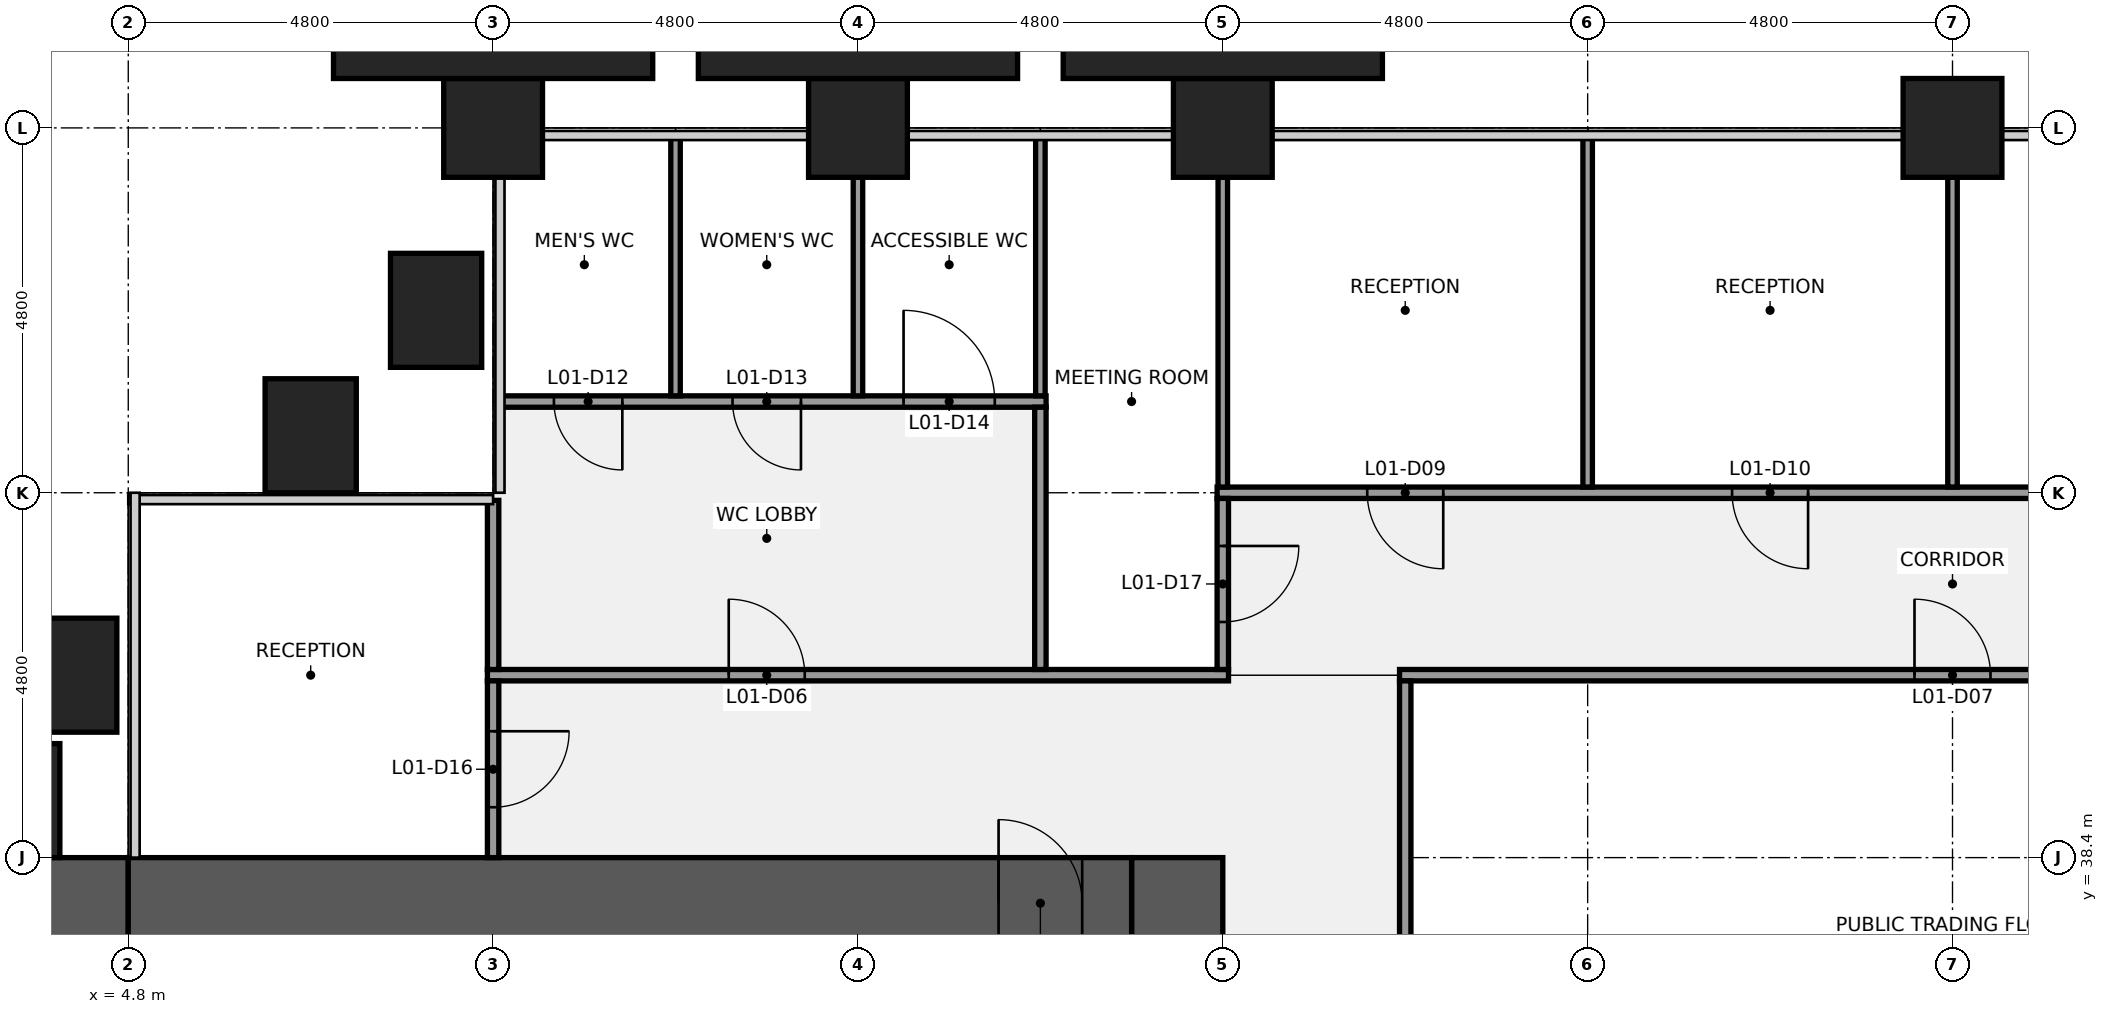
"""IFC4 building model, lengths in metres.
Left out: names, types, materials, properties, quantities, classifications, styles, units other than length and angle.
Written with IfcOpenShell. Run it as: python <this file> out.ifc"""

import sys

from ifc_helpers import new_model, si_unit, direction, frame, frame_2d, origin, origin_2d, place, context, subcontext, project, spatial, rectangle, extrude, element, fill, save


model = new_model("IFC4")
c1 = context("Model", 3, precision=1e-05, world=origin(), true_north=direction((0.0, 1.0)))
c2 = subcontext(c1, "Body", "Model", "MODEL_VIEW")
j1 = project(units=[si_unit("LENGTHUNIT", "METRE"), si_unit("PLANEANGLEUNIT", "RADIAN")], contexts=[c1])
p1 = place(None, origin())
s1 = spatial("IfcSite", under=j1, at=p1, CompositionType="ELEMENT")
p2 = place(p1, origin())
s2 = spatial("IfcBuilding", under=s1, at=p2, CompositionType="ELEMENT")
p3 = place(p2, frame((0.0, 0.0, 12.6)))
s3 = spatial("IfcBuildingStorey", under=s2, at=p3, CompositionType="ELEMENT", Elevation=12.6)
for number, where, z_axis, x_axis in (
    (1, (9.6, 48.0, 0.0), (0.0, 0.0, 1.0), (1.0, 0.0, 0.0)),
    (2, (14.4, 48.0, 0.0), (0.0, 0.0, 1.0), (1.0, 0.0, 0.0)),
    (3, (19.2, 48.0, 0.0), (0.0, 0.0, 1.0), (1.0, 0.0, 0.0)),
    (4, (28.8, 48.0, 0.0), (0.0, 0.0, 1.0), (1.0, 0.0, 0.0)),
):
    element("IfcColumn", number, at=place(p3, frame(where, z_axis=z_axis, x_axis=x_axis)), inside=s3, PredefinedType="COLUMN", context=c2, shape_type="SweptSolid", body=[
        extrude(rectangle(XDim=1.3, YDim=1.3, at=origin_2d()), origin(), (0.0, 0.0, 1.0), 4.4),
    ])
p4 = place(p3, frame((18.6, 38.4, 0.0), z_axis=(0.0, 0.0, 1.0), x_axis=(0.0, -1.0, 0.0)))
e5 = element("IfcWall", 5, at=p4, inside=s3, PredefinedType="SHEAR", context=c2, shape_type="SweptSolid", body=[
    extrude(rectangle(XDim=28.8, YDim=1.2, at=frame_2d((14.4, 0.0))), origin(), (0.0, 0.0, 1.0), 4.24),
])
p5 = place(p4, frame((18.3, 0.0, 0.0)))
e6 = element("IfcOpeningElement", 6, at=p5, cuts=e5, PredefinedType="OPENING", context=c2, shape_type="SweptSolid", body=[
    extrude(rectangle(XDim=1.8, YDim=2.1, at=frame_2d((0.9, 1.05))), frame((0.0, 0.61, 0.0), z_axis=(0.0, -1.0, 0.0), x_axis=(1.0, 0.0, 0.0)), (0.0, 0.0, 1.0), 1.22),
])
p6 = place(p4, frame((8.7, 0.0, 0.0)))
e7 = element("IfcOpeningElement", 7, at=p6, cuts=e5, PredefinedType="OPENING", context=c2, shape_type="SweptSolid", body=[
    extrude(rectangle(XDim=1.8, YDim=2.1, at=frame_2d((0.9, 1.05))), frame((0.0, 0.61, 0.0), z_axis=(0.0, -1.0, 0.0), x_axis=(1.0, 0.0, 0.0)), (0.0, 0.0, 1.0), 1.22),
])
p7 = place(p3, frame((1.2, 37.8, 0.0), z_axis=(0.0, 0.0, 1.0), x_axis=(1.0, 0.0, 0.0)))
e8 = element("IfcWall", 8, at=p7, inside=s3, PredefinedType="SHEAR", context=c2, shape_type="SweptSolid", body=[
    extrude(rectangle(XDim=3.6, YDim=1.2, at=frame_2d((1.8, 0.0))), origin(), (0.0, 0.0, 1.0), 4.24),
])
p8 = place(p3, frame((4.8, 37.8, 0.0), z_axis=(0.0, 0.0, 1.0), x_axis=(1.0, 0.0, 0.0)))
e9 = element("IfcWall", 9, at=p8, inside=s3, PredefinedType="SHEAR", context=c2, shape_type="SweptSolid", body=[
    extrude(rectangle(XDim=13.2, YDim=1.2, at=frame_2d((6.6, 0.0))), origin(), (0.0, 0.0, 1.0), 4.24),
])
p9 = place(p8, frame((11.45, 0.0, 0.0)))
e10 = element("IfcOpeningElement", 10, at=p9, cuts=e9, PredefinedType="OPENING", context=c2, shape_type="SweptSolid", body=[
    extrude(rectangle(XDim=1.1, YDim=2.1, at=frame_2d((0.55, 1.05))), frame((0.0, 0.61, 0.0), z_axis=(0.0, -1.0, 0.0), x_axis=(1.0, 0.0, 0.0)), (0.0, 0.0, 1.0), 1.22),
])
p10 = place(p3, frame((9.525, 40.8, 0.0), z_axis=(0.0, 0.0, 1.0), x_axis=(1.0, 0.0, 0.0)))
e11 = element("IfcWall", 11, at=p10, inside=s3, PredefinedType="PARTITIONING", context=c2, shape_type="SweptSolid", body=[
    extrude(rectangle(XDim=9.75, YDim=0.15, at=frame_2d((4.875, 0.0))), origin(), (0.0, 0.0, 1.0), 3.27),
])
p11 = place(p10, frame((3.175, 0.0, 0.0)))
e12 = element("IfcOpeningElement", 12, at=p11, cuts=e11, PredefinedType="OPENING", context=c2, shape_type="SweptSolid", body=[
    extrude(rectangle(XDim=1.0, YDim=2.1, at=frame_2d((0.5, 1.05))), frame((0.0, 0.085, 0.0), z_axis=(0.0, -1.0, 0.0), x_axis=(1.0, 0.0, 0.0)), (0.0, 0.0, 1.0), 0.17),
])
p12 = place(p3, frame((21.525, 40.8, 0.0), z_axis=(0.0, 0.0, 1.0), x_axis=(1.0, 0.0, 0.0)))
e13 = element("IfcWall", 13, at=p12, inside=s3, PredefinedType="PARTITIONING", context=c2, shape_type="SweptSolid", body=[
    extrude(rectangle(XDim=14.55, YDim=0.15, at=frame_2d((7.275, 0.0))), origin(), (0.0, 0.0, 1.0), 3.27),
])
p13 = place(p12, frame((6.775, 0.0, 0.0)))
e14 = element("IfcOpeningElement", 14, at=p13, cuts=e13, PredefinedType="OPENING", context=c2, shape_type="SweptSolid", body=[
    extrude(rectangle(XDim=1.0, YDim=2.1, at=frame_2d((0.5, 1.05))), frame((0.0, 0.085, 0.0), z_axis=(0.0, -1.0, 0.0), x_axis=(1.0, 0.0, 0.0)), (0.0, 0.0, 1.0), 0.17),
])
p14 = place(p3, frame((19.125, 43.2, 0.0), z_axis=(0.0, 0.0, 1.0), x_axis=(1.0, 0.0, 0.0)))
e15 = element("IfcWall", 15, at=p14, inside=s3, PredefinedType="PARTITIONING", context=c2, shape_type="SweptSolid", body=[
    extrude(rectangle(XDim=19.35, YDim=0.15, at=frame_2d((9.675, 0.0))), origin(), (0.0, 0.0, 1.0), 3.27),
])
p15 = place(p14, frame((1.975, 0.0, 0.0)))
e16 = element("IfcOpeningElement", 16, at=p15, cuts=e15, PredefinedType="OPENING", context=c2, shape_type="SweptSolid", body=[
    extrude(rectangle(XDim=1.0, YDim=2.1, at=frame_2d((0.5, 1.05))), frame((0.0, 0.085, 0.0), z_axis=(0.0, -1.0, 0.0), x_axis=(1.0, 0.0, 0.0)), (0.0, 0.0, 1.0), 0.17),
])
p16 = place(p14, frame((6.775, 0.0, 0.0)))
e17 = element("IfcOpeningElement", 17, at=p16, cuts=e15, PredefinedType="OPENING", context=c2, shape_type="SweptSolid", body=[
    extrude(rectangle(XDim=1.0, YDim=2.1, at=frame_2d((0.5, 1.05))), frame((0.0, 0.085, 0.0), z_axis=(0.0, -1.0, 0.0), x_axis=(1.0, 0.0, 0.0)), (0.0, 0.0, 1.0), 0.17),
])
p17 = place(p14, frame((13.975, 0.0, 0.0)))
e18 = element("IfcOpeningElement", 18, at=p17, cuts=e15, PredefinedType="OPENING", context=c2, shape_type="SweptSolid", body=[
    extrude(rectangle(XDim=1.0, YDim=2.1, at=frame_2d((0.5, 1.05))), frame((0.0, 0.085, 0.0), z_axis=(0.0, -1.0, 0.0), x_axis=(1.0, 0.0, 0.0)), (0.0, 0.0, 1.0), 0.17),
])
p18 = place(p3, frame((9.7, 44.4, 0.0), z_axis=(0.0, 0.0, 1.0), x_axis=(1.0, 0.0, 0.0)))
e19 = element("IfcWall", 19, at=p18, inside=s3, PredefinedType="PARTITIONING", context=c2, shape_type="SweptSolid", body=[
    extrude(rectangle(XDim=7.175, YDim=0.15, at=frame_2d((3.587, 0.0))), origin(), (0.0, 0.0, 1.0), 3.27),
])
p19 = place(p18, frame((0.7, 0.0, 0.0)))
e20 = element("IfcOpeningElement", 20, at=p19, cuts=e19, PredefinedType="OPENING", context=c2, shape_type="SweptSolid", body=[
    extrude(rectangle(XDim=0.9, YDim=2.1, at=frame_2d((0.45, 1.05))), frame((0.0, 0.085, 0.0), z_axis=(0.0, -1.0, 0.0), x_axis=(1.0, 0.0, 0.0)), (0.0, 0.0, 1.0), 0.17),
])
p20 = place(p18, frame((3.05, 0.0, 0.0)))
e21 = element("IfcOpeningElement", 21, at=p20, cuts=e19, PredefinedType="OPENING", context=c2, shape_type="SweptSolid", body=[
    extrude(rectangle(XDim=0.9, YDim=2.1, at=frame_2d((0.45, 1.05))), frame((0.0, 0.085, 0.0), z_axis=(0.0, -1.0, 0.0), x_axis=(1.0, 0.0, 0.0)), (0.0, 0.0, 1.0), 0.17),
])
p21 = place(p18, frame((5.3, 0.0, 0.0)))
e22 = element("IfcOpeningElement", 22, at=p21, cuts=e19, PredefinedType="OPENING", context=c2, shape_type="SweptSolid", body=[
    extrude(rectangle(XDim=1.2, YDim=2.1, at=frame_2d((0.6, 1.05))), frame((0.0, 0.085, 0.0), z_axis=(0.0, -1.0, 0.0), x_axis=(1.0, 0.0, 0.0)), (0.0, 0.0, 1.0), 0.17),
])
p22 = place(p3, frame((9.6, 38.4, 0.0), z_axis=(0.0, 0.0, 1.0), x_axis=(0.0, 1.0, 0.0)))
e23 = element("IfcWall", 23, at=p22, inside=s3, PredefinedType="PARTITIONING", context=c2, shape_type="SweptSolid", body=[
    extrude(rectangle(XDim=2.325, YDim=0.15, at=frame_2d((1.163, 0.0))), origin(), (0.0, 0.0, 1.0), 3.27),
])
p23 = place(p22, frame((0.663, 0.0, 0.0)))
e24 = element("IfcOpeningElement", 24, at=p23, cuts=e23, PredefinedType="OPENING", context=c2, shape_type="SweptSolid", body=[
    extrude(rectangle(XDim=1.0, YDim=2.1, at=frame_2d((0.5, 1.05))), frame((0.0, 0.085, 0.0), z_axis=(0.0, -1.0, 0.0), x_axis=(1.0, 0.0, 0.0)), (0.0, 0.0, 1.0), 0.17),
])
p24 = place(p3, frame((9.6, 40.875, 0.0), z_axis=(0.0, 0.0, 1.0), x_axis=(0.0, 1.0, 0.0)))
e25 = element("IfcWall", 25, at=p24, inside=s3, PredefinedType="PARTITIONING", context=c2, shape_type="SweptSolid", body=[
    extrude(rectangle(XDim=2.225, YDim=0.15, at=frame_2d((1.113, 0.0))), origin(), (0.0, 0.0, 1.0), 3.27),
])
p25 = place(p3, frame((12.0, 44.475, 0.0), z_axis=(0.0, 0.0, 1.0), x_axis=(0.0, 1.0, 0.0)))
e26 = element("IfcWall", 26, at=p25, inside=s3, PredefinedType="PARTITIONING", context=c2, shape_type="SweptSolid", body=[
    extrude(rectangle(XDim=3.425, YDim=0.125, at=frame_2d((1.712, 0.0))), origin(), (0.0, 0.0, 1.0), 3.27),
])
p26 = place(p3, frame((14.4, 44.475, 0.0), z_axis=(0.0, 0.0, 1.0), x_axis=(0.0, 1.0, 0.0)))
e27 = element("IfcWall", 27, at=p26, inside=s3, PredefinedType="PARTITIONING", context=c2, shape_type="SweptSolid", body=[
    extrude(rectangle(XDim=2.875, YDim=0.125, at=frame_2d((1.438, 0.0))), origin(), (0.0, 0.0, 1.0), 3.27),
])
p27 = place(p3, frame((16.8, 44.475, 0.0), z_axis=(0.0, 0.0, 1.0), x_axis=(0.0, 1.0, 0.0)))
e28 = element("IfcWall", 28, at=p27, inside=s3, PredefinedType="PARTITIONING", context=c2, shape_type="SweptSolid", body=[
    extrude(rectangle(XDim=3.425, YDim=0.125, at=frame_2d((1.712, 0.0))), origin(), (0.0, 0.0, 1.0), 3.27),
])
p28 = place(p3, frame((16.8, 40.875, 0.0), z_axis=(0.0, 0.0, 1.0), x_axis=(0.0, 1.0, 0.0)))
e29 = element("IfcWall", 29, at=p28, inside=s3, PredefinedType="PARTITIONING", context=c2, shape_type="SweptSolid", body=[
    extrude(rectangle(XDim=3.45, YDim=0.15, at=frame_2d((1.725, 0.0))), origin(), (0.0, 0.0, 1.0), 3.27),
])
p29 = place(p3, frame((19.2, 43.275, 0.0), z_axis=(0.0, 0.0, 1.0), x_axis=(0.0, 1.0, 0.0)))
e30 = element("IfcWall", 30, at=p29, inside=s3, PredefinedType="PARTITIONING", context=c2, shape_type="SweptSolid", body=[
    extrude(rectangle(XDim=4.075, YDim=0.125, at=frame_2d((2.038, 0.0))), origin(), (0.0, 0.0, 1.0), 3.27),
])
p30 = place(p3, frame((19.2, 40.875, 0.0), z_axis=(0.0, 0.0, 1.0), x_axis=(0.0, 1.0, 0.0)))
e31 = element("IfcWall", 31, at=p30, inside=s3, PredefinedType="PARTITIONING", context=c2, shape_type="SweptSolid", body=[
    extrude(rectangle(XDim=2.25, YDim=0.15, at=frame_2d((1.125, 0.0))), origin(), (0.0, 0.0, 1.0), 3.27),
])
p31 = place(p30, frame((0.625, 0.0, 0.0)))
e32 = element("IfcOpeningElement", 32, at=p31, cuts=e31, PredefinedType="OPENING", context=c2, shape_type="SweptSolid", body=[
    extrude(rectangle(XDim=1.0, YDim=2.1, at=frame_2d((0.5, 1.05))), frame((0.0, 0.085, 0.0), z_axis=(0.0, -1.0, 0.0), x_axis=(1.0, 0.0, 0.0)), (0.0, 0.0, 1.0), 0.17),
])
p32 = place(p3, frame((21.6, 33.663, 0.0), z_axis=(0.0, 0.0, 1.0), x_axis=(0.0, 1.0, 0.0)))
e33 = element("IfcWall", 33, at=p32, inside=s3, PredefinedType="PARTITIONING", context=c2, shape_type="SweptSolid", body=[
    extrude(rectangle(XDim=7.062, YDim=0.15, at=frame_2d((3.531, 0.0))), origin(), (0.0, 0.0, 1.0), 3.27),
])
p33 = place(p3, frame((24.0, 43.275, 0.0), z_axis=(0.0, 0.0, 1.0), x_axis=(0.0, 1.0, 0.0)))
e34 = element("IfcWall", 34, at=p33, inside=s3, PredefinedType="PARTITIONING", context=c2, shape_type="SweptSolid", body=[
    extrude(rectangle(XDim=4.625, YDim=0.125, at=frame_2d((2.312, 0.0))), origin(), (0.0, 0.0, 1.0), 3.27),
])
p34 = place(p3, frame((28.8, 43.275, 0.0), z_axis=(0.0, 0.0, 1.0), x_axis=(0.0, 1.0, 0.0)))
e35 = element("IfcWall", 35, at=p34, inside=s3, PredefinedType="PARTITIONING", context=c2, shape_type="SweptSolid", body=[
    extrude(rectangle(XDim=4.075, YDim=0.125, at=frame_2d((2.038, 0.0))), origin(), (0.0, 0.0, 1.0), 3.27),
])
for number, where, z_axis, x_axis in (
    (36, (8.85, 45.6, 0.0), (0.0, 0.0, 1.0), (0.0, 1.0, 0.0)),
    (37, (7.2, 43.95, 0.0), (0.0, 0.0, 1.0), (1.0, 0.0, 0.0)),
    (38, (4.05, 40.8, 0.0), (0.0, 0.0, 1.0), (0.0, 1.0, 0.0)),
):
    element("IfcColumn", number, at=place(p3, frame(where, z_axis=z_axis, x_axis=x_axis)), inside=s3, PredefinedType="PILASTER", context=c2, shape_type="SweptSolid", body=[
        extrude(rectangle(XDim=1.2, YDim=1.5, at=origin_2d()), origin(), (0.0, 0.0, 1.0), 4.4),
    ])
p35 = place(p3, frame((2.4, 39.15, 0.0), z_axis=(0.0, 0.0, 1.0), x_axis=(1.0, 0.0, 0.0)))
e39 = element("IfcColumn", 39, at=p35, inside=s3, PredefinedType="PILASTER", context=c2, shape_type="SweptSolid", body=[
    extrude(rectangle(XDim=3.0, YDim=1.5, at=origin_2d()), origin(), (0.0, 0.0, 1.0), 4.4),
])
for number, where, z_axis, x_axis in (
    (40, (9.6, 49.075, 0.0), (0.0, 0.0, 1.0), (1.0, 0.0, 0.0)),
    (41, (14.4, 49.075, 0.0), (0.0, 0.0, 1.0), (1.0, 0.0, 0.0)),
    (42, (19.2, 49.075, 0.0), (0.0, 0.0, 1.0), (1.0, 0.0, 0.0)),
):
    element("IfcColumn", number, at=place(p3, frame(where, z_axis=z_axis, x_axis=x_axis)), inside=s3, PredefinedType="PILASTER", context=c2, shape_type="SweptSolid", body=[
        extrude(rectangle(XDim=4.2, YDim=0.85, at=origin_2d()), origin(), (0.0, 0.0, 1.0), 4.4),
    ])
p36 = place(p9, origin())
e43 = element("IfcDoor", 43, at=p36, inside=s3, OperationType="SINGLE_SWING_LEFT", PredefinedType="DOOR", context=c2, shape_type="SweptSolid", body=[
    extrude(rectangle(XDim=1.1, YDim=2.1, at=frame_2d((0.55, 1.05))), frame((0.0, 0.025, 0.0), z_axis=(0.0, -1.0, 0.0), x_axis=(1.0, 0.0, 0.0)), (0.0, 0.0, 1.0), 0.05),
])
fill(e10, e43)
p37 = place(p11, origin())
e44 = element("IfcDoor", 44, at=p37, inside=s3, OperationType="SINGLE_SWING_LEFT", PredefinedType="DOOR", context=c2, shape_type="SweptSolid", body=[
    extrude(rectangle(XDim=1.0, YDim=2.1, at=frame_2d((0.5, 1.05))), frame((0.0, 0.025, 0.0), z_axis=(0.0, -1.0, 0.0), x_axis=(1.0, 0.0, 0.0)), (0.0, 0.0, 1.0), 0.05),
])
fill(e12, e44)
p38 = place(p13, origin())
e45 = element("IfcDoor", 45, at=p38, inside=s3, OperationType="SINGLE_SWING_LEFT", PredefinedType="DOOR", context=c2, shape_type="SweptSolid", body=[
    extrude(rectangle(XDim=1.0, YDim=2.1, at=frame_2d((0.5, 1.05))), frame((0.0, 0.025, 0.0), z_axis=(0.0, -1.0, 0.0), x_axis=(1.0, 0.0, 0.0)), (0.0, 0.0, 1.0), 0.05),
])
fill(e14, e45)
p39 = place(p15, origin())
e46 = element("IfcDoor", 46, at=p39, inside=s3, OperationType="SINGLE_SWING_RIGHT", PredefinedType="DOOR", context=c2, shape_type="SweptSolid", body=[
    extrude(rectangle(XDim=1.0, YDim=2.1, at=frame_2d((0.5, 1.05))), frame((0.0, 0.025, 0.0), z_axis=(0.0, -1.0, 0.0), x_axis=(1.0, 0.0, 0.0)), (0.0, 0.0, 1.0), 0.05),
])
fill(e16, e46)
p40 = place(p16, origin())
e47 = element("IfcDoor", 47, at=p40, inside=s3, OperationType="SINGLE_SWING_RIGHT", PredefinedType="DOOR", context=c2, shape_type="SweptSolid", body=[
    extrude(rectangle(XDim=1.0, YDim=2.1, at=frame_2d((0.5, 1.05))), frame((0.0, 0.025, 0.0), z_axis=(0.0, -1.0, 0.0), x_axis=(1.0, 0.0, 0.0)), (0.0, 0.0, 1.0), 0.05),
])
fill(e17, e47)
p41 = place(p19, origin())
e48 = element("IfcDoor", 48, at=p41, inside=s3, OperationType="SINGLE_SWING_RIGHT", PredefinedType="DOOR", context=c2, shape_type="SweptSolid", body=[
    extrude(rectangle(XDim=0.9, YDim=2.1, at=frame_2d((0.45, 1.05))), frame((0.0, 0.025, 0.0), z_axis=(0.0, -1.0, 0.0), x_axis=(1.0, 0.0, 0.0)), (0.0, 0.0, 1.0), 0.05),
])
fill(e20, e48)
p42 = place(p20, origin())
e49 = element("IfcDoor", 49, at=p42, inside=s3, OperationType="SINGLE_SWING_RIGHT", PredefinedType="DOOR", context=c2, shape_type="SweptSolid", body=[
    extrude(rectangle(XDim=0.9, YDim=2.1, at=frame_2d((0.45, 1.05))), frame((0.0, 0.025, 0.0), z_axis=(0.0, -1.0, 0.0), x_axis=(1.0, 0.0, 0.0)), (0.0, 0.0, 1.0), 0.05),
])
fill(e21, e49)
p43 = place(p21, origin())
e50 = element("IfcDoor", 50, at=p43, inside=s3, OperationType="SINGLE_SWING_LEFT", PredefinedType="DOOR", context=c2, shape_type="SweptSolid", body=[
    extrude(rectangle(XDim=1.2, YDim=2.1, at=frame_2d((0.6, 1.05))), frame((0.0, 0.025, 0.0), z_axis=(0.0, -1.0, 0.0), x_axis=(1.0, 0.0, 0.0)), (0.0, 0.0, 1.0), 0.05),
])
fill(e22, e50)
p44 = place(p23, origin())
e51 = element("IfcDoor", 51, at=p44, inside=s3, OperationType="SINGLE_SWING_RIGHT", PredefinedType="DOOR", context=c2, shape_type="SweptSolid", body=[
    extrude(rectangle(XDim=1.0, YDim=2.1, at=frame_2d((0.5, 1.05))), frame((0.0, 0.025, 0.0), z_axis=(0.0, -1.0, 0.0), x_axis=(1.0, 0.0, 0.0)), (0.0, 0.0, 1.0), 0.05),
])
fill(e24, e51)
p45 = place(p31, origin())
e52 = element("IfcDoor", 52, at=p45, inside=s3, OperationType="SINGLE_SWING_RIGHT", PredefinedType="DOOR", context=c2, shape_type="SweptSolid", body=[
    extrude(rectangle(XDim=1.0, YDim=2.1, at=frame_2d((0.5, 1.05))), frame((0.0, 0.025, 0.0), z_axis=(0.0, -1.0, 0.0), x_axis=(1.0, 0.0, 0.0)), (0.0, 0.0, 1.0), 0.05),
])
fill(e32, e52)
save(model, sys.argv[1])
